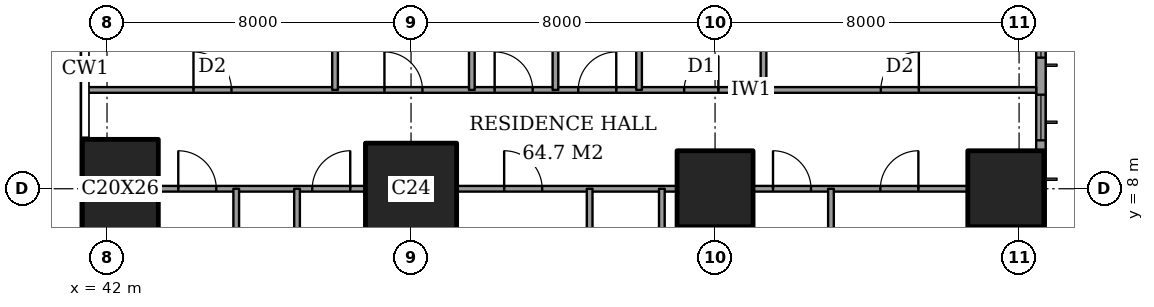
"""IFC4 building model, lengths in metres.
Left out: names, types, materials, properties, quantities, classifications, styles, units other than length and angle.
Written with IfcOpenShell. Run it as: python <this file> out.ifc"""

import sys

from ifc_helpers import new_model, si_unit, direction, frame, frame_2d, origin, origin_2d, place, context, subcontext, project, spatial, rectangle, extrude, element, fill, save


model = new_model("IFC4")
c1 = context("Model", 3, precision=1e-05, world=origin(), true_north=direction((0.0, 1.0)))
c2 = subcontext(c1, "Body", "Model", "MODEL_VIEW")
j1 = project(units=[si_unit("LENGTHUNIT", "METRE"), si_unit("PLANEANGLEUNIT", "RADIAN")], contexts=[c1])
p1 = place(None, origin())
s1 = spatial("IfcSite", under=j1, at=p1, CompositionType="ELEMENT")
p2 = place(p1, origin())
s2 = spatial("IfcBuilding", under=s1, at=p2, CompositionType="ELEMENT")
p3 = place(p2, frame((0.0, 0.0, 83.6)))
s3 = spatial("IfcBuildingStorey", under=s2, at=p3, CompositionType="ELEMENT", Elevation=83.6)
p4 = place(p3, frame((42.35, 8.0, 0.0), z_axis=(0.0, 0.0, 1.0), x_axis=(1.0, 0.0, 0.0)))
e1 = element("IfcColumn", 1, at=p4, inside=s3, PredefinedType="COLUMN", context=c2, shape_type="SweptSolid", body=[
    extrude(rectangle(XDim=2.0, YDim=2.6, at=origin_2d()), origin(), (0.0, 0.0, 1.0), 3.6),
])
p5 = place(p3, frame((50.0, 8.0, 0.0), z_axis=(0.0, 0.0, 1.0), x_axis=(1.0, 0.0, 0.0)))
e2 = element("IfcColumn", 2, at=p5, inside=s3, PredefinedType="COLUMN", context=c2, shape_type="SweptSolid", body=[
    extrude(rectangle(XDim=2.4, YDim=2.4, at=origin_2d()), origin(), (0.0, 0.0, 1.0), 3.6),
])
for number, where, z_axis, x_axis in (
    (3, (58.0, 8.0, 0.0), (0.0, 0.0, 1.0), (1.0, 0.0, 0.0)),
    (4, (65.65, 8.0, 0.0), (0.0, 0.0, 1.0), (1.0, 0.0, 0.0)),
):
    element("IfcColumn", number, at=place(p3, frame(where, z_axis=z_axis, x_axis=x_axis)), inside=s3, PredefinedType="COLUMN", context=c2, shape_type="SweptSolid", body=[
        extrude(rectangle(XDim=2.0, YDim=2.0, at=origin_2d()), origin(), (0.0, 0.0, 1.0), 3.6),
    ])
p6 = place(p3, frame((66.575, 3.175, 0.0), z_axis=(0.0, 0.0, 1.0), x_axis=(0.0, 1.0, 0.0)))
e5 = element("IfcWall", 5, at=p6, inside=s3, PredefinedType="SOLIDWALL", context=c2, shape_type="SweptSolid", body=[
    extrude(rectangle(XDim=41.65, YDim=0.25, at=frame_2d((20.825, 0.0))), origin(), (0.0, 0.0, 1.0), 3.6),
])
p7 = place(p6, frame((0.775, 0.0, 0.6)))
e6 = element("IfcOpeningElement", 6, at=p7, cuts=e5, PredefinedType="OPENING", context=c2, shape_type="SweptSolid", body=[
    extrude(rectangle(XDim=2.4, YDim=2.0, at=frame_2d((1.2, 1.0))), frame((0.0, 0.135, 0.0), z_axis=(0.0, -1.0, 0.0), x_axis=(1.0, 0.0, 0.0)), (0.0, 0.0, 1.0), 0.27),
])
p8 = place(p6, frame((6.1, 0.0, 0.6)))
e7 = element("IfcOpeningElement", 7, at=p8, cuts=e5, PredefinedType="OPENING", context=c2, shape_type="SweptSolid", body=[
    extrude(rectangle(XDim=1.2, YDim=2.0, at=frame_2d((0.6, 1.0))), frame((0.0, 0.135, 0.0), z_axis=(0.0, -1.0, 0.0), x_axis=(1.0, 0.0, 0.0)), (0.0, 0.0, 1.0), 0.27),
])
p9 = place(p6, frame((8.275, 0.0, 0.6)))
e8 = element("IfcOpeningElement", 8, at=p9, cuts=e5, PredefinedType="OPENING", context=c2, shape_type="SweptSolid", body=[
    extrude(rectangle(XDim=2.4, YDim=2.0, at=frame_2d((1.2, 1.0))), frame((0.0, 0.135, 0.0), z_axis=(0.0, -1.0, 0.0), x_axis=(1.0, 0.0, 0.0)), (0.0, 0.0, 1.0), 0.27),
])
p10 = place(p6, frame((15.775, 0.0, 0.6)))
e9 = element("IfcOpeningElement", 9, at=p10, cuts=e5, PredefinedType="OPENING", context=c2, shape_type="SweptSolid", body=[
    extrude(rectangle(XDim=2.4, YDim=2.0, at=frame_2d((1.2, 1.0))), frame((0.0, 0.135, 0.0), z_axis=(0.0, -1.0, 0.0), x_axis=(1.0, 0.0, 0.0)), (0.0, 0.0, 1.0), 0.27),
])
p11 = place(p6, frame((23.475, 0.0, 0.6)))
e10 = element("IfcOpeningElement", 10, at=p11, cuts=e5, PredefinedType="OPENING", context=c2, shape_type="SweptSolid", body=[
    extrude(rectangle(XDim=2.4, YDim=2.0, at=frame_2d((1.2, 1.0))), frame((0.0, 0.135, 0.0), z_axis=(0.0, -1.0, 0.0), x_axis=(1.0, 0.0, 0.0)), (0.0, 0.0, 1.0), 0.27),
])
p12 = place(p6, frame((30.975, 0.0, 0.6)))
e11 = element("IfcOpeningElement", 11, at=p12, cuts=e5, PredefinedType="OPENING", context=c2, shape_type="SweptSolid", body=[
    extrude(rectangle(XDim=2.4, YDim=2.0, at=frame_2d((1.2, 1.0))), frame((0.0, 0.135, 0.0), z_axis=(0.0, -1.0, 0.0), x_axis=(1.0, 0.0, 0.0)), (0.0, 0.0, 1.0), 0.27),
])
p13 = place(p6, frame((34.5, 0.0, 0.6)))
e12 = element("IfcOpeningElement", 12, at=p13, cuts=e5, PredefinedType="OPENING", context=c2, shape_type="SweptSolid", body=[
    extrude(rectangle(XDim=1.2, YDim=2.0, at=frame_2d((0.6, 1.0))), frame((0.0, 0.135, 0.0), z_axis=(0.0, -1.0, 0.0), x_axis=(1.0, 0.0, 0.0)), (0.0, 0.0, 1.0), 0.27),
])
p14 = place(p6, frame((38.475, 0.0, 0.6)))
e13 = element("IfcOpeningElement", 13, at=p14, cuts=e5, PredefinedType="OPENING", context=c2, shape_type="SweptSolid", body=[
    extrude(rectangle(XDim=2.4, YDim=2.0, at=frame_2d((1.2, 1.0))), frame((0.0, 0.135, 0.0), z_axis=(0.0, -1.0, 0.0), x_axis=(1.0, 0.0, 0.0)), (0.0, 0.0, 1.0), 0.27),
])
p15 = place(p3, frame((43.35, 8.0, 0.0), z_axis=(0.0, 0.0, 1.0), x_axis=(1.0, 0.0, 0.0)))
e14 = element("IfcWall", 14, at=p15, inside=s3, PredefinedType="PARTITIONING", context=c2, shape_type="SweptSolid", body=[
    extrude(rectangle(XDim=5.45, YDim=0.15, at=frame_2d((2.725, 0.0))), origin(), (0.0, 0.0, 1.0), 3.35),
])
p16 = place(p15, frame((4.05, 0.0, 0.0)))
e15 = element("IfcOpeningElement", 15, at=p16, cuts=e14, PredefinedType="OPENING", context=c2, shape_type="SweptSolid", body=[
    extrude(rectangle(XDim=1.0, YDim=2.1, at=frame_2d((0.5, 1.05))), frame((0.0, 0.085, 0.0), z_axis=(0.0, -1.0, 0.0), x_axis=(1.0, 0.0, 0.0)), (0.0, 0.0, 1.0), 0.17),
])
p17 = place(p15, frame((0.525, 0.0, 0.0)))
e16 = element("IfcOpeningElement", 16, at=p17, cuts=e14, PredefinedType="OPENING", context=c2, shape_type="SweptSolid", body=[
    extrude(rectangle(XDim=1.0, YDim=2.1, at=frame_2d((0.5, 1.05))), frame((0.0, 0.085, 0.0), z_axis=(0.0, -1.0, 0.0), x_axis=(1.0, 0.0, 0.0)), (0.0, 0.0, 1.0), 0.17),
])
p18 = place(p3, frame((51.2, 8.0, 0.0), z_axis=(0.0, 0.0, 1.0), x_axis=(1.0, 0.0, 0.0)))
e17 = element("IfcWall", 17, at=p18, inside=s3, PredefinedType="PARTITIONING", context=c2, shape_type="SweptSolid", body=[
    extrude(rectangle(XDim=5.8, YDim=0.15, at=frame_2d((2.9, 0.0))), origin(), (0.0, 0.0, 1.0), 3.35),
])
p19 = place(p18, frame((1.25, 0.0, 0.0)))
e18 = element("IfcOpeningElement", 18, at=p19, cuts=e17, PredefinedType="OPENING", context=c2, shape_type="SweptSolid", body=[
    extrude(rectangle(XDim=1.0, YDim=2.1, at=frame_2d((0.5, 1.05))), frame((0.0, 0.085, 0.0), z_axis=(0.0, -1.0, 0.0), x_axis=(1.0, 0.0, 0.0)), (0.0, 0.0, 1.0), 0.17),
])
p20 = place(p3, frame((59.0, 8.0, 0.0), z_axis=(0.0, 0.0, 1.0), x_axis=(1.0, 0.0, 0.0)))
e19 = element("IfcWall", 19, at=p20, inside=s3, PredefinedType="PARTITIONING", context=c2, shape_type="SweptSolid", body=[
    extrude(rectangle(XDim=5.65, YDim=0.15, at=frame_2d((2.825, 0.0))), origin(), (0.0, 0.0, 1.0), 3.35),
])
p21 = place(p20, frame((3.35, 0.0, 0.0)))
e20 = element("IfcOpeningElement", 20, at=p21, cuts=e19, PredefinedType="OPENING", context=c2, shape_type="SweptSolid", body=[
    extrude(rectangle(XDim=1.0, YDim=2.1, at=frame_2d((0.5, 1.05))), frame((0.0, 0.085, 0.0), z_axis=(0.0, -1.0, 0.0), x_axis=(1.0, 0.0, 0.0)), (0.0, 0.0, 1.0), 0.17),
])
p22 = place(p20, frame((0.525, 0.0, 0.0)))
e21 = element("IfcOpeningElement", 21, at=p22, cuts=e19, PredefinedType="OPENING", context=c2, shape_type="SweptSolid", body=[
    extrude(rectangle(XDim=1.0, YDim=2.1, at=frame_2d((0.5, 1.05))), frame((0.0, 0.085, 0.0), z_axis=(0.0, -1.0, 0.0), x_axis=(1.0, 0.0, 0.0)), (0.0, 0.0, 1.0), 0.17),
])
p23 = place(p3, frame((41.439, 10.6, 0.0), z_axis=(0.0, 0.0, 1.0), x_axis=(1.0, 0.0, 0.0)))
e22 = element("IfcWall", 22, at=p23, inside=s3, PredefinedType="PARTITIONING", context=c2, shape_type="SweptSolid", body=[
    extrude(rectangle(XDim=25.011, YDim=0.15, at=frame_2d((12.505, 0.0))), origin(), (0.0, 0.0, 1.0), 3.35),
])
p24 = place(p23, frame((10.761, 0.0, 0.0)))
e23 = element("IfcOpeningElement", 23, at=p24, cuts=e22, PredefinedType="OPENING", context=c2, shape_type="SweptSolid", body=[
    extrude(rectangle(XDim=1.0, YDim=2.1, at=frame_2d((0.5, 1.05))), frame((0.0, 0.085, 0.0), z_axis=(0.0, -1.0, 0.0), x_axis=(1.0, 0.0, 0.0)), (0.0, 0.0, 1.0), 0.17),
])
p25 = place(p23, frame((20.924, 0.0, 0.0)))
e24 = element("IfcOpeningElement", 24, at=p25, cuts=e22, PredefinedType="OPENING", context=c2, shape_type="SweptSolid", body=[
    extrude(rectangle(XDim=1.0, YDim=2.1, at=frame_2d((0.5, 1.05))), frame((0.0, 0.085, 0.0), z_axis=(0.0, -1.0, 0.0), x_axis=(1.0, 0.0, 0.0)), (0.0, 0.0, 1.0), 0.17),
])
p26 = place(p23, frame((15.749, 0.0, 0.0)))
e25 = element("IfcOpeningElement", 25, at=p26, cuts=e22, PredefinedType="OPENING", context=c2, shape_type="SweptSolid", body=[
    extrude(rectangle(XDim=0.9, YDim=2.1, at=frame_2d((0.45, 1.05))), frame((0.0, 0.085, 0.0), z_axis=(0.0, -1.0, 0.0), x_axis=(1.0, 0.0, 0.0)), (0.0, 0.0, 1.0), 0.17),
])
p27 = place(p23, frame((12.961, 0.0, 0.0)))
e26 = element("IfcOpeningElement", 26, at=p27, cuts=e22, PredefinedType="OPENING", context=c2, shape_type="SweptSolid", body=[
    extrude(rectangle(XDim=1.0, YDim=2.1, at=frame_2d((0.5, 1.05))), frame((0.0, 0.085, 0.0), z_axis=(0.0, -1.0, 0.0), x_axis=(1.0, 0.0, 0.0)), (0.0, 0.0, 1.0), 0.17),
])
p28 = place(p23, frame((7.861, 0.0, 0.0)))
e27 = element("IfcOpeningElement", 27, at=p28, cuts=e22, PredefinedType="OPENING", context=c2, shape_type="SweptSolid", body=[
    extrude(rectangle(XDim=1.0, YDim=2.1, at=frame_2d((0.5, 1.05))), frame((0.0, 0.085, 0.0), z_axis=(0.0, -1.0, 0.0), x_axis=(1.0, 0.0, 0.0)), (0.0, 0.0, 1.0), 0.17),
])
p29 = place(p23, frame((2.836, 0.0, 0.0)))
e28 = element("IfcOpeningElement", 28, at=p29, cuts=e22, PredefinedType="OPENING", context=c2, shape_type="SweptSolid", body=[
    extrude(rectangle(XDim=1.0, YDim=2.1, at=frame_2d((0.5, 1.05))), frame((0.0, 0.085, 0.0), z_axis=(0.0, -1.0, 0.0), x_axis=(1.0, 0.0, 0.0)), (0.0, 0.0, 1.0), 0.17),
])
p30 = place(p3, frame((45.4, -0.45, 0.0), z_axis=(0.0, 0.0, 1.0), x_axis=(0.0, 1.0, 0.0)))
e29 = element("IfcWall", 29, at=p30, inside=s3, PredefinedType="PARTITIONING", context=c2, shape_type="SweptSolid", body=[
    extrude(rectangle(XDim=8.45, YDim=0.15, at=frame_2d((4.225, 0.0))), origin(), (0.0, 0.0, 1.0), 3.35),
])
p31 = place(p30, frame((3.775, 0.0, 0.0)))
e30 = element("IfcOpeningElement", 30, at=p31, cuts=e29, PredefinedType="OPENING", context=c2, shape_type="SweptSolid", body=[
    extrude(rectangle(XDim=0.9, YDim=2.1, at=frame_2d((0.45, 1.05))), frame((0.0, 0.085, 0.0), z_axis=(0.0, -1.0, 0.0), x_axis=(1.0, 0.0, 0.0)), (0.0, 0.0, 1.0), 0.17),
])
p32 = place(p3, frame((47.0, -0.45, 0.0), z_axis=(0.0, 0.0, 1.0), x_axis=(0.0, 1.0, 0.0)))
e31 = element("IfcWall", 31, at=p32, inside=s3, PredefinedType="PARTITIONING", context=c2, shape_type="SweptSolid", body=[
    extrude(rectangle(XDim=8.45, YDim=0.15, at=frame_2d((4.225, 0.0))), origin(), (0.0, 0.0, 1.0), 3.35),
])
for number, where, z_axis, x_axis in (
    (32, (48.0, 10.6, 0.0), (0.0, 0.0, 1.0), (0.0, 1.0, 0.0)),
    (33, (51.6, 10.6, 0.0), (0.0, 0.0, 1.0), (0.0, 1.0, 0.0)),
    (34, (53.8, 10.6, 0.0), (0.0, 0.0, 1.0), (0.0, 1.0, 0.0)),
):
    element("IfcWall", number, at=place(p3, frame(where, z_axis=z_axis, x_axis=x_axis)), inside=s3, PredefinedType="PARTITIONING", context=c2, shape_type="SweptSolid", body=[
        extrude(rectangle(XDim=6.4, YDim=0.15, at=frame_2d((3.2, 0.0))), origin(), (0.0, 0.0, 1.0), 3.35),
    ])
p33 = place(p3, frame((54.7, -0.45, 0.0), z_axis=(0.0, 0.0, 1.0), x_axis=(0.0, 1.0, 0.0)))
e35 = element("IfcWall", 35, at=p33, inside=s3, PredefinedType="PARTITIONING", context=c2, shape_type="SweptSolid", body=[
    extrude(rectangle(XDim=8.45, YDim=0.15, at=frame_2d((4.225, 0.0))), origin(), (0.0, 0.0, 1.0), 3.35),
])
p34 = place(p33, frame((3.775, 0.0, 0.0)))
e36 = element("IfcOpeningElement", 36, at=p34, cuts=e35, PredefinedType="OPENING", context=c2, shape_type="SweptSolid", body=[
    extrude(rectangle(XDim=0.9, YDim=2.1, at=frame_2d((0.45, 1.05))), frame((0.0, 0.085, 0.0), z_axis=(0.0, -1.0, 0.0), x_axis=(1.0, 0.0, 0.0)), (0.0, 0.0, 1.0), 0.17),
])
p35 = place(p3, frame((56.0, 10.6, 0.0), z_axis=(0.0, 0.0, 1.0), x_axis=(0.0, 1.0, 0.0)))
e37 = element("IfcWall", 37, at=p35, inside=s3, PredefinedType="PARTITIONING", context=c2, shape_type="SweptSolid", body=[
    extrude(rectangle(XDim=11.0, YDim=0.15, at=frame_2d((5.5, 0.0))), origin(), (0.0, 0.0, 1.0), 3.35),
])
p36 = place(p35, frame((8.2, 0.0, 0.0)))
e38 = element("IfcOpeningElement", 38, at=p36, cuts=e37, PredefinedType="OPENING", context=c2, shape_type="SweptSolid", body=[
    extrude(rectangle(XDim=1.0, YDim=2.1, at=frame_2d((0.5, 1.05))), frame((0.0, 0.085, 0.0), z_axis=(0.0, -1.0, 0.0), x_axis=(1.0, 0.0, 0.0)), (0.0, 0.0, 1.0), 0.17),
])
p37 = place(p3, frame((56.6, -0.45, 0.0), z_axis=(0.0, 0.0, 1.0), x_axis=(0.0, 1.0, 0.0)))
e39 = element("IfcWall", 39, at=p37, inside=s3, PredefinedType="PARTITIONING", context=c2, shape_type="SweptSolid", body=[
    extrude(rectangle(XDim=8.45, YDim=0.15, at=frame_2d((4.225, 0.0))), origin(), (0.0, 0.0, 1.0), 3.35),
])
p38 = place(p3, frame((59.275, 10.6, 0.0), z_axis=(0.0, 0.0, 1.0), x_axis=(0.0, 1.0, 0.0)))
e40 = element("IfcWall", 40, at=p38, inside=s3, PredefinedType="PARTITIONING", context=c2, shape_type="SweptSolid", body=[
    extrude(rectangle(XDim=4.2, YDim=0.15, at=frame_2d((2.1, 0.0))), origin(), (0.0, 0.0, 1.0), 3.35),
])
p39 = place(p3, frame((61.05, -0.45, 0.0), z_axis=(0.0, 0.0, 1.0), x_axis=(0.0, 1.0, 0.0)))
e41 = element("IfcWall", 41, at=p39, inside=s3, PredefinedType="PARTITIONING", context=c2, shape_type="SweptSolid", body=[
    extrude(rectangle(XDim=8.45, YDim=0.15, at=frame_2d((4.225, 0.0))), origin(), (0.0, 0.0, 1.0), 3.35),
])
p40 = place(p8, origin())
e42 = element("IfcWindow", 42, at=p40, inside=s3, PartitioningType="SINGLE_PANEL", PredefinedType="WINDOW", context=c2, shape_type="SweptSolid", body=[
    extrude(rectangle(XDim=1.2, YDim=2.0, at=frame_2d((0.6, 1.0))), frame((0.0, 0.03, 0.0), z_axis=(0.0, -1.0, 0.0), x_axis=(1.0, 0.0, 0.0)), (0.0, 0.0, 1.0), 0.06),
])
fill(e7, e42)
p41 = place(p9, origin())
e43 = element("IfcWindow", 43, at=p41, inside=s3, PartitioningType="SINGLE_PANEL", PredefinedType="WINDOW", context=c2, shape_type="SweptSolid", body=[
    extrude(rectangle(XDim=2.4, YDim=2.0, at=frame_2d((1.2, 1.0))), frame((0.0, 0.03, 0.0), z_axis=(0.0, -1.0, 0.0), x_axis=(1.0, 0.0, 0.0)), (0.0, 0.0, 1.0), 0.06),
])
fill(e8, e43)
p42 = place(p21, origin())
e44 = element("IfcDoor", 44, at=p42, inside=s3, OperationType="SINGLE_SWING_LEFT", PredefinedType="DOOR", context=c2, shape_type="SweptSolid", body=[
    extrude(rectangle(XDim=1.0, YDim=2.1, at=frame_2d((0.5, 1.05))), frame((0.0, 0.025, 0.0), z_axis=(0.0, -1.0, 0.0), x_axis=(1.0, 0.0, 0.0)), (0.0, 0.0, 1.0), 0.05),
])
fill(e20, e44)
p43 = place(p22, origin())
e45 = element("IfcDoor", 45, at=p43, inside=s3, OperationType="SINGLE_SWING_RIGHT", PredefinedType="DOOR", context=c2, shape_type="SweptSolid", body=[
    extrude(rectangle(XDim=1.0, YDim=2.1, at=frame_2d((0.5, 1.05))), frame((0.0, 0.025, 0.0), z_axis=(0.0, -1.0, 0.0), x_axis=(1.0, 0.0, 0.0)), (0.0, 0.0, 1.0), 0.05),
])
fill(e21, e45)
p44 = place(p19, origin())
e46 = element("IfcDoor", 46, at=p44, inside=s3, OperationType="SINGLE_SWING_RIGHT", PredefinedType="DOOR", context=c2, shape_type="SweptSolid", body=[
    extrude(rectangle(XDim=1.0, YDim=2.1, at=frame_2d((0.5, 1.05))), frame((0.0, 0.025, 0.0), z_axis=(0.0, -1.0, 0.0), x_axis=(1.0, 0.0, 0.0)), (0.0, 0.0, 1.0), 0.05),
])
fill(e18, e46)
p45 = place(p16, origin())
e47 = element("IfcDoor", 47, at=p45, inside=s3, OperationType="SINGLE_SWING_LEFT", PredefinedType="DOOR", context=c2, shape_type="SweptSolid", body=[
    extrude(rectangle(XDim=1.0, YDim=2.1, at=frame_2d((0.5, 1.05))), frame((0.0, 0.025, 0.0), z_axis=(0.0, -1.0, 0.0), x_axis=(1.0, 0.0, 0.0)), (0.0, 0.0, 1.0), 0.05),
])
fill(e15, e47)
p46 = place(p17, origin())
e48 = element("IfcDoor", 48, at=p46, inside=s3, OperationType="SINGLE_SWING_RIGHT", PredefinedType="DOOR", context=c2, shape_type="SweptSolid", body=[
    extrude(rectangle(XDim=1.0, YDim=2.1, at=frame_2d((0.5, 1.05))), frame((0.0, 0.025, 0.0), z_axis=(0.0, -1.0, 0.0), x_axis=(1.0, 0.0, 0.0)), (0.0, 0.0, 1.0), 0.05),
])
fill(e16, e48)
p47 = place(p24, origin())
e49 = element("IfcDoor", 49, at=p47, inside=s3, OperationType="SINGLE_SWING_RIGHT", PredefinedType="DOOR", context=c2, shape_type="SweptSolid", body=[
    extrude(rectangle(XDim=1.0, YDim=2.1, at=frame_2d((0.5, 1.05))), frame((0.0, 0.025, 0.0), z_axis=(0.0, -1.0, 0.0), x_axis=(1.0, 0.0, 0.0)), (0.0, 0.0, 1.0), 0.05),
])
fill(e23, e49)
p48 = place(p25, origin())
e50 = element("IfcDoor", 50, at=p48, inside=s3, OperationType="SINGLE_SWING_LEFT", PredefinedType="DOOR", context=c2, shape_type="SweptSolid", body=[
    extrude(rectangle(XDim=1.0, YDim=2.1, at=frame_2d((0.5, 1.05))), frame((0.0, 0.025, 0.0), z_axis=(0.0, -1.0, 0.0), x_axis=(1.0, 0.0, 0.0)), (0.0, 0.0, 1.0), 0.05),
])
fill(e24, e50)
p49 = place(p26, origin())
e51 = element("IfcDoor", 51, at=p49, inside=s3, OperationType="SINGLE_SWING_LEFT", PredefinedType="DOOR", context=c2, shape_type="SweptSolid", body=[
    extrude(rectangle(XDim=0.9, YDim=2.1, at=frame_2d((0.45, 1.05))), frame((0.0, 0.025, 0.0), z_axis=(0.0, -1.0, 0.0), x_axis=(1.0, 0.0, 0.0)), (0.0, 0.0, 1.0), 0.05),
])
fill(e25, e51)
p50 = place(p27, origin())
e52 = element("IfcDoor", 52, at=p50, inside=s3, OperationType="SINGLE_SWING_LEFT", PredefinedType="DOOR", context=c2, shape_type="SweptSolid", body=[
    extrude(rectangle(XDim=1.0, YDim=2.1, at=frame_2d((0.5, 1.05))), frame((0.0, 0.025, 0.0), z_axis=(0.0, -1.0, 0.0), x_axis=(1.0, 0.0, 0.0)), (0.0, 0.0, 1.0), 0.05),
])
fill(e26, e52)
p51 = place(p28, origin())
e53 = element("IfcDoor", 53, at=p51, inside=s3, OperationType="SINGLE_SWING_RIGHT", PredefinedType="DOOR", context=c2, shape_type="SweptSolid", body=[
    extrude(rectangle(XDim=1.0, YDim=2.1, at=frame_2d((0.5, 1.05))), frame((0.0, 0.025, 0.0), z_axis=(0.0, -1.0, 0.0), x_axis=(1.0, 0.0, 0.0)), (0.0, 0.0, 1.0), 0.05),
])
fill(e27, e53)
p52 = place(p29, origin())
e54 = element("IfcDoor", 54, at=p52, inside=s3, OperationType="SINGLE_SWING_RIGHT", PredefinedType="DOOR", context=c2, shape_type="SweptSolid", body=[
    extrude(rectangle(XDim=1.0, YDim=2.1, at=frame_2d((0.5, 1.05))), frame((0.0, 0.025, 0.0), z_axis=(0.0, -1.0, 0.0), x_axis=(1.0, 0.0, 0.0)), (0.0, 0.0, 1.0), 0.05),
])
fill(e28, e54)
save(model, sys.argv[1])
